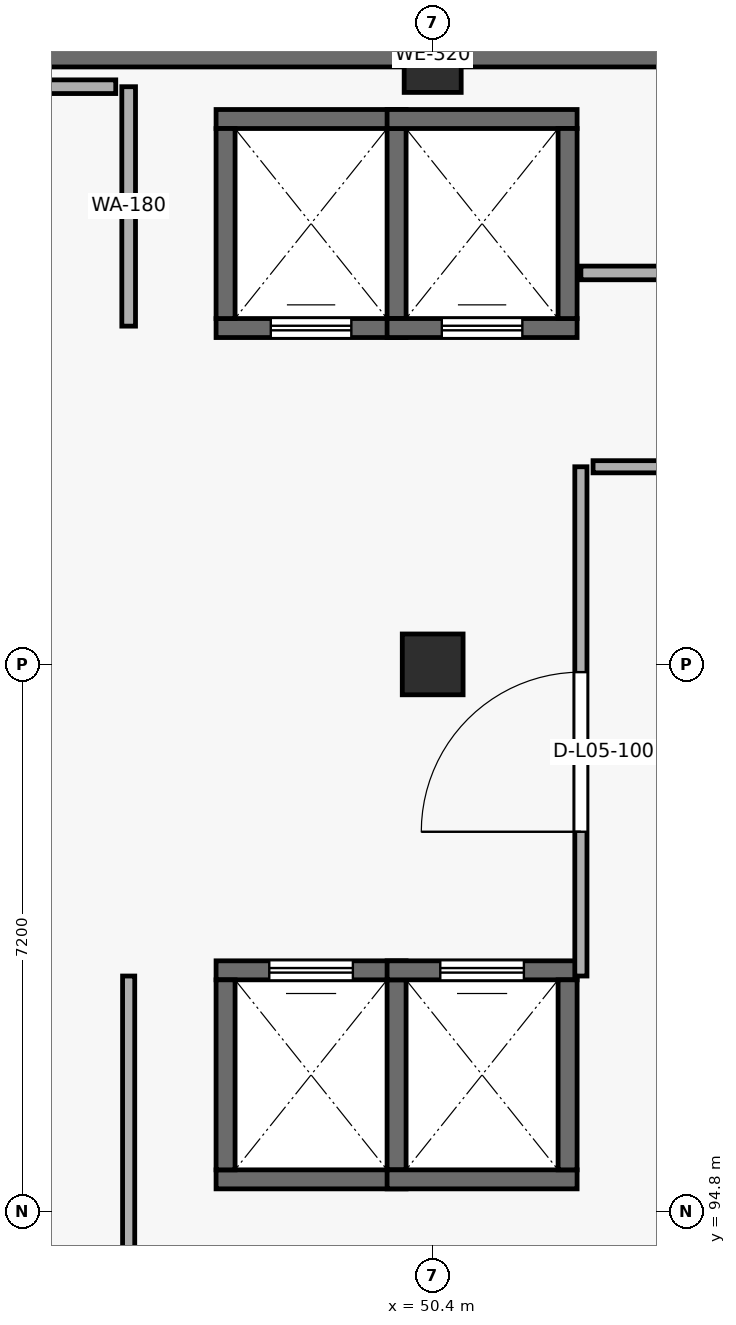
"""IFC4 building model, lengths in metres.
Left out: names, types, materials, properties, quantities, classifications, styles, units other than length and angle.
Written with IfcOpenShell. Run it as: python <this file> out.ifc"""

import sys

from ifc_helpers import new_model, si_unit, direction, frame, frame_2d, origin, origin_2d, place, context, subcontext, project, spatial, rectangle, extrude, element, fill, save


model = new_model("IFC4")
c1 = context("Model", 3, precision=1e-05, world=origin(), true_north=direction((0.0, 1.0)))
c2 = subcontext(c1, "Body", "Model", "MODEL_VIEW")
j1 = project(units=[si_unit("LENGTHUNIT", "METRE"), si_unit("PLANEANGLEUNIT", "RADIAN")], contexts=[c1])
p1 = place(None, origin())
s1 = spatial("IfcSite", under=j1, at=p1, CompositionType="ELEMENT")
p2 = place(p1, origin())
s2 = spatial("IfcBuilding", under=s1, at=p2, CompositionType="ELEMENT")
p3 = place(p2, frame((0.0, 0.0, 20.4)))
s3 = spatial("IfcBuildingStorey", under=s2, at=p3, CompositionType="ELEMENT", Elevation=20.4)
p4 = place(p3, frame((50.4, 102.0, 0.0), z_axis=(0.0, 0.0, 1.0), x_axis=(1.0, 0.0, 0.0)))
e1 = element("IfcColumn", 1, at=p4, inside=s3, PredefinedType="COLUMN", context=c2, shape_type="SweptSolid", body=[
    extrude(rectangle(XDim=0.8, YDim=0.8, at=origin_2d()), origin(), (0.0, 0.0, 1.0), 5.1),
])
p5 = place(p3, frame((50.4, 109.9, 0.0), z_axis=(0.0, 0.0, 1.0), x_axis=(1.0, 0.0, 0.0)))
e2 = element("IfcColumn", 2, at=p5, inside=s3, PredefinedType="COLUMN", context=c2, shape_type="SweptSolid", body=[
    extrude(rectangle(XDim=0.75, YDim=0.75, at=origin_2d()), origin(), (0.0, 0.0, 1.0), 5.1),
])
p6 = place(p3, frame((33.6, 110.02, 0.0), z_axis=(0.0, 0.0, 1.0), x_axis=(1.0, 0.0, 0.0)))
e3 = element("IfcWall", 3, at=p6, inside=s3, PredefinedType="SOLIDWALL", context=c2, shape_type="SweptSolid", body=[
    extrude(rectangle(XDim=33.6, YDim=0.32, at=frame_2d((16.8, 0.0))), origin(), (0.0, 0.0, 1.0), 4.84),
])
p7 = place(p3, frame((47.55, 95.225, 0.0), z_axis=(0.0, 0.0, 1.0), x_axis=(1.0, 0.0, 0.0)))
e4 = element("IfcWall", 4, at=p7, inside=s3, PredefinedType="SHEAR", context=c2, shape_type="SweptSolid", body=[
    extrude(rectangle(XDim=2.5, YDim=0.25, at=frame_2d((1.25, 0.0))), origin(), (0.0, 0.0, 1.0), 4.84),
])
p8 = place(p3, frame((50.05, 97.975, 0.0), z_axis=(0.0, 0.0, 1.0), x_axis=(-1.0, 0.0, 0.0)))
e5 = element("IfcWall", 5, at=p8, inside=s3, PredefinedType="SHEAR", context=c2, shape_type="SweptSolid", body=[
    extrude(rectangle(XDim=2.5, YDim=0.25, at=frame_2d((1.25, 0.0))), origin(), (0.0, 0.0, 1.0), 4.84),
])
p9 = place(p8, frame((0.7, 0.0, 0.0)))
e6 = element("IfcOpeningElement", 6, at=p9, cuts=e5, PredefinedType="OPENING", context=c2, shape_type="SweptSolid", body=[
    extrude(rectangle(XDim=1.1, YDim=2.2, at=frame_2d((0.55, 1.1))), frame((0.0, 0.135, 0.0), z_axis=(0.0, -1.0, 0.0), x_axis=(1.0, 0.0, 0.0)), (0.0, 0.0, 1.0), 0.27),
])
for number, where, z_axis, x_axis in (
    (7, (47.675, 95.35, 0.0), (0.0, 0.0, 1.0), (0.0, 1.0, 0.0)),
    (8, (49.925, 97.85, 0.0), (0.0, 0.0, 1.0), (0.0, -1.0, 0.0)),
    (9, (49.8, 95.225, 0.0), (0.0, 0.0, 1.0), (1.0, 0.0, 0.0)),
):
    element("IfcWall", number, at=place(p3, frame(where, z_axis=z_axis, x_axis=x_axis)), inside=s3, PredefinedType="SHEAR", context=c2, shape_type="SweptSolid", body=[
        extrude(rectangle(XDim=2.5, YDim=0.25, at=frame_2d((1.25, 0.0))), origin(), (0.0, 0.0, 1.0), 4.84),
    ])
p10 = place(p3, frame((52.3, 97.975, 0.0), z_axis=(0.0, 0.0, 1.0), x_axis=(-1.0, 0.0, 0.0)))
e10 = element("IfcWall", 10, at=p10, inside=s3, PredefinedType="SHEAR", context=c2, shape_type="SweptSolid", body=[
    extrude(rectangle(XDim=2.5, YDim=0.25, at=frame_2d((1.25, 0.0))), origin(), (0.0, 0.0, 1.0), 4.84),
])
p11 = place(p10, frame((0.7, 0.0, 0.0)))
e11 = element("IfcOpeningElement", 11, at=p11, cuts=e10, PredefinedType="OPENING", context=c2, shape_type="SweptSolid", body=[
    extrude(rectangle(XDim=1.1, YDim=2.2, at=frame_2d((0.55, 1.1))), frame((0.0, 0.135, 0.0), z_axis=(0.0, -1.0, 0.0), x_axis=(1.0, 0.0, 0.0)), (0.0, 0.0, 1.0), 0.27),
])
p12 = place(p3, frame((52.175, 97.85, 0.0), z_axis=(0.0, 0.0, 1.0), x_axis=(0.0, -1.0, 0.0)))
e12 = element("IfcWall", 12, at=p12, inside=s3, PredefinedType="SHEAR", context=c2, shape_type="SweptSolid", body=[
    extrude(rectangle(XDim=2.5, YDim=0.25, at=frame_2d((1.25, 0.0))), origin(), (0.0, 0.0, 1.0), 4.84),
])
p13 = place(p3, frame((47.55, 106.425, 0.0), z_axis=(0.0, 0.0, 1.0), x_axis=(1.0, 0.0, 0.0)))
e13 = element("IfcWall", 13, at=p13, inside=s3, PredefinedType="SHEAR", context=c2, shape_type="SweptSolid", body=[
    extrude(rectangle(XDim=2.5, YDim=0.25, at=frame_2d((1.25, 0.0))), origin(), (0.0, 0.0, 1.0), 4.84),
])
p14 = place(p13, frame((0.72, 0.0, 0.0)))
e14 = element("IfcOpeningElement", 14, at=p14, cuts=e13, PredefinedType="OPENING", context=c2, shape_type="SweptSolid", body=[
    extrude(rectangle(XDim=1.06, YDim=2.2, at=frame_2d((0.53, 1.1))), frame((0.0, 0.135, 0.0), z_axis=(0.0, -1.0, 0.0), x_axis=(1.0, 0.0, 0.0)), (0.0, 0.0, 1.0), 0.27),
])
for number, where, z_axis, x_axis in (
    (15, (50.05, 109.175, 0.0), (0.0, 0.0, 1.0), (-1.0, 0.0, 0.0)),
    (16, (47.675, 106.55, 0.0), (0.0, 0.0, 1.0), (0.0, 1.0, 0.0)),
    (17, (49.925, 109.05, 0.0), (0.0, 0.0, 1.0), (0.0, -1.0, 0.0)),
):
    element("IfcWall", number, at=place(p3, frame(where, z_axis=z_axis, x_axis=x_axis)), inside=s3, PredefinedType="SHEAR", context=c2, shape_type="SweptSolid", body=[
        extrude(rectangle(XDim=2.5, YDim=0.25, at=frame_2d((1.25, 0.0))), origin(), (0.0, 0.0, 1.0), 4.84),
    ])
p15 = place(p3, frame((49.8, 106.425, 0.0), z_axis=(0.0, 0.0, 1.0), x_axis=(1.0, 0.0, 0.0)))
e18 = element("IfcWall", 18, at=p15, inside=s3, PredefinedType="SHEAR", context=c2, shape_type="SweptSolid", body=[
    extrude(rectangle(XDim=2.5, YDim=0.25, at=frame_2d((1.25, 0.0))), origin(), (0.0, 0.0, 1.0), 4.84),
])
p16 = place(p15, frame((0.72, 0.0, 0.0)))
e19 = element("IfcOpeningElement", 19, at=p16, cuts=e18, PredefinedType="OPENING", context=c2, shape_type="SweptSolid", body=[
    extrude(rectangle(XDim=1.06, YDim=2.2, at=frame_2d((0.53, 1.1))), frame((0.0, 0.135, 0.0), z_axis=(0.0, -1.0, 0.0), x_axis=(1.0, 0.0, 0.0)), (0.0, 0.0, 1.0), 0.27),
])
for number, where, z_axis, x_axis in (
    (20, (52.3, 109.175, 0.0), (0.0, 0.0, 1.0), (-1.0, 0.0, 0.0)),
    (21, (52.175, 109.05, 0.0), (0.0, 0.0, 1.0), (0.0, -1.0, 0.0)),
):
    element("IfcWall", number, at=place(p3, frame(where, z_axis=z_axis, x_axis=x_axis)), inside=s3, PredefinedType="SHEAR", context=c2, shape_type="SweptSolid", body=[
        extrude(rectangle(XDim=2.5, YDim=0.25, at=frame_2d((1.25, 0.0))), origin(), (0.0, 0.0, 1.0), 4.84),
    ])
p17 = place(p3, frame((63.11, 107.15, 0.0), z_axis=(0.0, 0.0, 1.0), x_axis=(-1.0, 0.0, 0.0)))
e22 = element("IfcWall", 22, at=p17, inside=s3, PredefinedType="PARTITIONING", context=c2, shape_type="SweptSolid", body=[
    extrude(rectangle(XDim=10.76, YDim=0.18, at=frame_2d((5.38, 0.0))), origin(), (0.0, 0.0, 1.0), 4.84),
])
p18 = place(p3, frame((52.35, 97.9, 0.0), z_axis=(0.0, 0.0, 1.0), x_axis=(0.0, 1.0, 0.0)))
e23 = element("IfcWall", 23, at=p18, inside=s3, PredefinedType="PARTITIONING", context=c2, shape_type="SweptSolid", body=[
    extrude(rectangle(XDim=6.7, YDim=0.16, at=frame_2d((3.35, 0.0))), origin(), (0.0, 0.0, 1.0), 4.84),
])
p19 = place(p18, frame((1.898, 0.0, 0.0)))
e24 = element("IfcOpeningElement", 24, at=p19, cuts=e23, PredefinedType="OPENING", context=c2, shape_type="SweptSolid", body=[
    extrude(rectangle(XDim=2.1, YDim=2.65, at=frame_2d((1.05, 1.325))), frame((0.0, 0.09, 0.0), z_axis=(0.0, -1.0, 0.0), x_axis=(1.0, 0.0, 0.0)), (0.0, 0.0, 1.0), 0.18),
])
p20 = place(p3, frame((46.4, 94.01, 0.0), z_axis=(0.0, 0.0, 1.0), x_axis=(0.0, 1.0, 0.0)))
e25 = element("IfcWall", 25, at=p20, inside=s3, PredefinedType="PARTITIONING", context=c2, shape_type="SweptSolid", body=[
    extrude(rectangle(XDim=3.89, YDim=0.16, at=frame_2d((1.945, 0.0))), origin(), (0.0, 0.0, 1.0), 4.84),
])
p21 = place(p3, frame((46.4, 106.45, 0.0), z_axis=(0.0, 0.0, 1.0), x_axis=(0.0, 1.0, 0.0)))
e26 = element("IfcWall", 26, at=p21, inside=s3, PredefinedType="PARTITIONING", context=c2, shape_type="SweptSolid", body=[
    extrude(rectangle(XDim=3.15, YDim=0.18, at=frame_2d((1.575, 0.0))), origin(), (0.0, 0.0, 1.0), 4.84),
])
p22 = place(p3, frame((52.51, 104.6, 0.0), z_axis=(0.0, 0.0, 1.0), x_axis=(1.0, 0.0, 0.0)))
e27 = element("IfcWall", 27, at=p22, inside=s3, PredefinedType="PARTITIONING", context=c2, shape_type="SweptSolid", body=[
    extrude(rectangle(XDim=2.57, YDim=0.16, at=frame_2d((1.285, 0.0))), origin(), (0.0, 0.0, 1.0), 4.84),
])
p23 = place(p3, frame((46.23, 109.6, 0.0), z_axis=(0.0, 0.0, 1.0), x_axis=(-1.0, 0.0, 0.0)))
e28 = element("IfcWall", 28, at=p23, inside=s3, PredefinedType="PARTITIONING", context=c2, shape_type="SweptSolid", body=[
    extrude(rectangle(XDim=1.895, YDim=0.18, at=frame_2d((0.948, 0.0))), origin(), (0.0, 0.0, 1.0), 3.9),
])
p24 = place(p9, origin())
e29 = element("IfcDoor", 29, at=p24, inside=s3, OperationType="SLIDING_TO_RIGHT", PredefinedType="DOOR", context=c2, shape_type="SweptSolid", body=[
    extrude(rectangle(XDim=1.1, YDim=2.2, at=frame_2d((0.55, 1.1))), frame((0.0, 0.025, 0.0), z_axis=(0.0, -1.0, 0.0), x_axis=(1.0, 0.0, 0.0)), (0.0, 0.0, 1.0), 0.05),
])
fill(e6, e29)
p25 = place(p11, origin())
e30 = element("IfcDoor", 30, at=p25, inside=s3, OperationType="SLIDING_TO_RIGHT", PredefinedType="DOOR", context=c2, shape_type="SweptSolid", body=[
    extrude(rectangle(XDim=1.1, YDim=2.2, at=frame_2d((0.55, 1.1))), frame((0.0, 0.025, 0.0), z_axis=(0.0, -1.0, 0.0), x_axis=(1.0, 0.0, 0.0)), (0.0, 0.0, 1.0), 0.05),
])
fill(e11, e30)
p26 = place(p14, origin())
e31 = element("IfcDoor", 31, at=p26, inside=s3, OperationType="SLIDING_TO_RIGHT", PredefinedType="DOOR", context=c2, shape_type="SweptSolid", body=[
    extrude(rectangle(XDim=1.06, YDim=2.2, at=frame_2d((0.53, 1.1))), frame((0.0, 0.025, 0.0), z_axis=(0.0, -1.0, 0.0), x_axis=(1.0, 0.0, 0.0)), (0.0, 0.0, 1.0), 0.05),
])
fill(e14, e31)
p27 = place(p16, origin())
e32 = element("IfcDoor", 32, at=p27, inside=s3, OperationType="SLIDING_TO_RIGHT", PredefinedType="DOOR", context=c2, shape_type="SweptSolid", body=[
    extrude(rectangle(XDim=1.06, YDim=2.2, at=frame_2d((0.53, 1.1))), frame((0.0, 0.025, 0.0), z_axis=(0.0, -1.0, 0.0), x_axis=(1.0, 0.0, 0.0)), (0.0, 0.0, 1.0), 0.05),
])
fill(e19, e32)
p28 = place(p19, origin())
e33 = element("IfcDoor", 33, at=p28, inside=s3, OperationType="SINGLE_SWING_LEFT", PredefinedType="DOOR", context=c2, shape_type="SweptSolid", body=[
    extrude(rectangle(XDim=2.1, YDim=2.65, at=frame_2d((1.05, 1.325))), frame((0.0, 0.025, 0.0), z_axis=(0.0, -1.0, 0.0), x_axis=(1.0, 0.0, 0.0)), (0.0, 0.0, 1.0), 0.05),
])
fill(e24, e33)
save(model, sys.argv[1])
